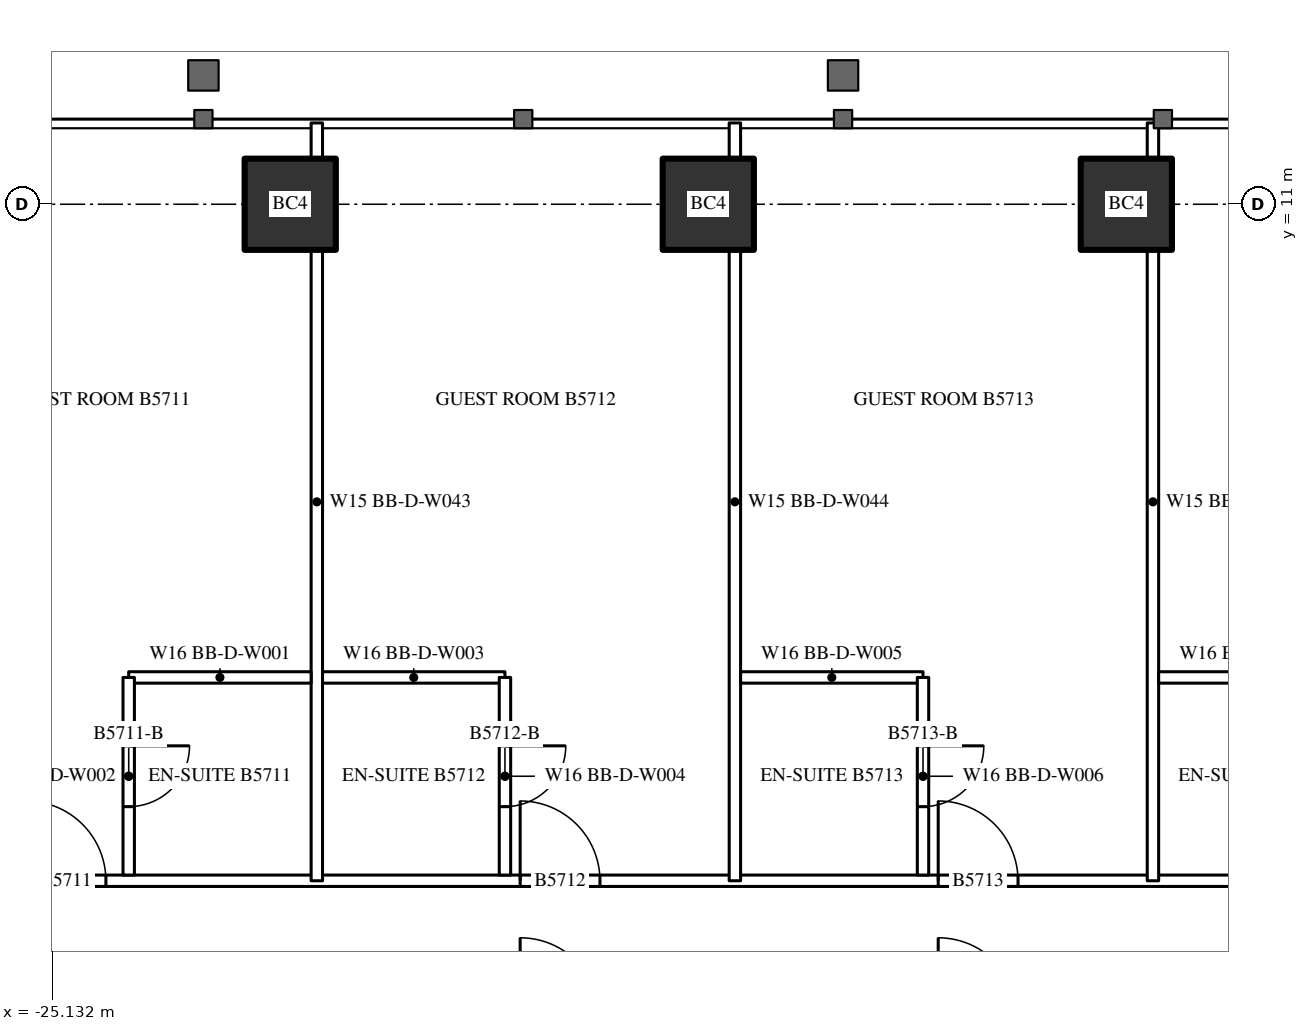
"""IFC4 building model, lengths in metres.
Left out: names, types, materials, properties, quantities, classifications, styles, units other than length and angle.
Written with IfcOpenShell. Run it as: python <this file> out.ifc"""

import sys

from ifc_helpers import new_model, si_unit, direction, frame, frame_2d, origin, origin_2d, place, context, subcontext, project, spatial, rectangle, hollow_rectangle, extrude, element, fill, save


model = new_model("IFC4")
c1 = context("Model", 3, precision=1e-05, world=origin(), true_north=direction((0.0, 1.0)))
c2 = subcontext(c1, "Body", "Model", "MODEL_VIEW")
j1 = project(units=[si_unit("LENGTHUNIT", "METRE"), si_unit("PLANEANGLEUNIT", "RADIAN")], contexts=[c1])
p1 = place(None, origin())
s1 = spatial("IfcSite", under=j1, at=p1, CompositionType="ELEMENT")
p2 = place(p1, origin())
s2 = spatial("IfcBuilding", under=s1, at=p2, CompositionType="ELEMENT")
p3 = place(p2, frame((0.0, 0.0, 215.3)))
s3 = spatial("IfcBuildingStorey", under=s2, at=p3, CompositionType="ELEMENT", Elevation=215.3)
for number, where, z_axis, x_axis in (
    (1, (-22.0, 11.0, 0.0), (0.0, 0.0, 1.0), (1.0, 0.0, 0.0)),
    (2, (-16.5, 11.0, 0.0), (0.0, 0.0, 1.0), (1.0, 0.0, 0.0)),
    (3, (-11.0, 11.0, 0.0), (0.0, 0.0, 1.0), (1.0, 0.0, 0.0)),
):
    element("IfcColumn", number, at=place(p3, frame(where, z_axis=z_axis, x_axis=x_axis)), inside=s3, PredefinedType="COLUMN", context=c2, shape_type="SweptSolid", body=[
        extrude(hollow_rectangle(XDim=1.2, YDim=1.2, WallThickness=0.12, at=origin_2d()), origin(), (0.0, 0.0, 1.0), 3.6),
    ])
p4 = place(p3, frame((-27.5, 2.1, 0.0), z_axis=(0.0, 0.0, 1.0), x_axis=(1.0, 0.0, 0.0)))
e4 = element("IfcWall", 4, at=p4, inside=s3, PredefinedType="PARTITIONING", context=c2, shape_type="SweptSolid", body=[
    extrude(rectangle(XDim=55.0, YDim=0.15, at=frame_2d((27.5, 0.0))), origin(), (0.0, 0.0, 1.0), 3.4),
])
p5 = place(p4, frame((2.025, 0.0, 0.0)))
e5 = element("IfcOpeningElement", 5, at=p5, cuts=e4, PredefinedType="OPENING", context=c2, shape_type="SweptSolid", body=[
    extrude(rectangle(XDim=1.05, YDim=2.4, at=frame_2d((0.525, 1.2))), frame((0.0, 0.085, 0.0), z_axis=(0.0, -1.0, 0.0), x_axis=(1.0, 0.0, 0.0)), (0.0, 0.0, 1.0), 0.17),
])
p6 = place(p4, frame((8.525, 0.0, 0.0)))
e6 = element("IfcOpeningElement", 6, at=p6, cuts=e4, PredefinedType="OPENING", context=c2, shape_type="SweptSolid", body=[
    extrude(rectangle(XDim=1.05, YDim=2.4, at=frame_2d((0.525, 1.2))), frame((0.0, 0.085, 0.0), z_axis=(0.0, -1.0, 0.0), x_axis=(1.0, 0.0, 0.0)), (0.0, 0.0, 1.0), 0.17),
])
p7 = place(p4, frame((14.025, 0.0, 0.0)))
e7 = element("IfcOpeningElement", 7, at=p7, cuts=e4, PredefinedType="OPENING", context=c2, shape_type="SweptSolid", body=[
    extrude(rectangle(XDim=1.05, YDim=2.4, at=frame_2d((0.525, 1.2))), frame((0.0, 0.085, 0.0), z_axis=(0.0, -1.0, 0.0), x_axis=(1.0, 0.0, 0.0)), (0.0, 0.0, 1.0), 0.17),
])
p8 = place(p4, frame((19.525, 0.0, 0.0)))
e8 = element("IfcOpeningElement", 8, at=p8, cuts=e4, PredefinedType="OPENING", context=c2, shape_type="SweptSolid", body=[
    extrude(rectangle(XDim=1.05, YDim=2.4, at=frame_2d((0.525, 1.2))), frame((0.0, 0.085, 0.0), z_axis=(0.0, -1.0, 0.0), x_axis=(1.0, 0.0, 0.0)), (0.0, 0.0, 1.0), 0.17),
])
p9 = place(p4, frame((25.025, 0.0, 0.0)))
e9 = element("IfcOpeningElement", 9, at=p9, cuts=e4, PredefinedType="OPENING", context=c2, shape_type="SweptSolid", body=[
    extrude(rectangle(XDim=1.05, YDim=2.4, at=frame_2d((0.525, 1.2))), frame((0.0, 0.085, 0.0), z_axis=(0.0, -1.0, 0.0), x_axis=(1.0, 0.0, 0.0)), (0.0, 0.0, 1.0), 0.17),
])
p10 = place(p4, frame((30.525, 0.0, 0.0)))
e10 = element("IfcOpeningElement", 10, at=p10, cuts=e4, PredefinedType="OPENING", context=c2, shape_type="SweptSolid", body=[
    extrude(rectangle(XDim=1.05, YDim=2.4, at=frame_2d((0.525, 1.2))), frame((0.0, 0.085, 0.0), z_axis=(0.0, -1.0, 0.0), x_axis=(1.0, 0.0, 0.0)), (0.0, 0.0, 1.0), 0.17),
])
p11 = place(p4, frame((36.025, 0.0, 0.0)))
e11 = element("IfcOpeningElement", 11, at=p11, cuts=e4, PredefinedType="OPENING", context=c2, shape_type="SweptSolid", body=[
    extrude(rectangle(XDim=1.05, YDim=2.4, at=frame_2d((0.525, 1.2))), frame((0.0, 0.085, 0.0), z_axis=(0.0, -1.0, 0.0), x_axis=(1.0, 0.0, 0.0)), (0.0, 0.0, 1.0), 0.17),
])
p12 = place(p4, frame((41.525, 0.0, 0.0)))
e12 = element("IfcOpeningElement", 12, at=p12, cuts=e4, PredefinedType="OPENING", context=c2, shape_type="SweptSolid", body=[
    extrude(rectangle(XDim=1.05, YDim=2.4, at=frame_2d((0.525, 1.2))), frame((0.0, 0.085, 0.0), z_axis=(0.0, -1.0, 0.0), x_axis=(1.0, 0.0, 0.0)), (0.0, 0.0, 1.0), 0.17),
])
p13 = place(p4, frame((47.025, 0.0, 0.0)))
e13 = element("IfcOpeningElement", 13, at=p13, cuts=e4, PredefinedType="OPENING", context=c2, shape_type="SweptSolid", body=[
    extrude(rectangle(XDim=1.05, YDim=2.4, at=frame_2d((0.525, 1.2))), frame((0.0, 0.085, 0.0), z_axis=(0.0, -1.0, 0.0), x_axis=(1.0, 0.0, 0.0)), (0.0, 0.0, 1.0), 0.17),
])
p14 = place(p4, frame((52.525, 0.0, 0.0)))
e14 = element("IfcOpeningElement", 14, at=p14, cuts=e4, PredefinedType="OPENING", context=c2, shape_type="SweptSolid", body=[
    extrude(rectangle(XDim=1.05, YDim=2.4, at=frame_2d((0.525, 1.2))), frame((0.0, 0.085, 0.0), z_axis=(0.0, -1.0, 0.0), x_axis=(1.0, 0.0, 0.0)), (0.0, 0.0, 1.0), 0.17),
])
for number, where, z_axis, x_axis in (
    (15, (-21.65, 2.1, 0.0), (0.0, 0.0, 1.0), (0.0, 1.0, 0.0)),
    (16, (-16.15, 2.1, 0.0), (0.0, 0.0, 1.0), (0.0, 1.0, 0.0)),
    (17, (-10.65, 2.1, 0.0), (0.0, 0.0, 1.0), (0.0, 1.0, 0.0)),
):
    element("IfcWall", number, at=place(p3, frame(where, z_axis=z_axis, x_axis=x_axis)), inside=s3, PredefinedType="PARTITIONING", context=c2, shape_type="SweptSolid", body=[
        extrude(rectangle(XDim=9.97, YDim=0.15, at=frame_2d((4.985, 0.0))), origin(), (0.0, 0.0, 1.0), 3.4),
    ])
p15 = place(p3, frame((-24.125, 4.775, 0.0), z_axis=(0.0, 0.0, 1.0), x_axis=(1.0, 0.0, 0.0)))
e18 = element("IfcWall", 18, at=p15, inside=s3, PredefinedType="PARTITIONING", context=c2, shape_type="SweptSolid", body=[
    extrude(rectangle(XDim=2.4, YDim=0.15, at=frame_2d((1.2, 0.0))), origin(), (0.0, 0.0, 1.0), 3.4),
])
p16 = place(p3, frame((-24.125, 2.175, 0.0), z_axis=(0.0, 0.0, 1.0), x_axis=(0.0, 1.0, 0.0)))
e19 = element("IfcWall", 19, at=p16, inside=s3, PredefinedType="PARTITIONING", context=c2, shape_type="SweptSolid", body=[
    extrude(rectangle(XDim=2.6, YDim=0.15, at=frame_2d((1.3, 0.0))), origin(), (0.0, 0.0, 1.0), 3.4),
])
p17 = place(p16, frame((0.9, 0.0, 0.0)))
e20 = element("IfcOpeningElement", 20, at=p17, cuts=e19, PredefinedType="OPENING", context=c2, shape_type="SweptSolid", body=[
    extrude(rectangle(XDim=0.8, YDim=2.2, at=frame_2d((0.4, 1.1))), frame((0.0, 0.085, 0.0), z_axis=(0.0, -1.0, 0.0), x_axis=(1.0, 0.0, 0.0)), (0.0, 0.0, 1.0), 0.17),
])
p18 = place(p3, frame((-21.575, 4.775, 0.0), z_axis=(0.0, 0.0, 1.0), x_axis=(1.0, 0.0, 0.0)))
e21 = element("IfcWall", 21, at=p18, inside=s3, PredefinedType="PARTITIONING", context=c2, shape_type="SweptSolid", body=[
    extrude(rectangle(XDim=2.4, YDim=0.15, at=frame_2d((1.2, 0.0))), origin(), (0.0, 0.0, 1.0), 3.4),
])
p19 = place(p3, frame((-19.175, 2.175, 0.0), z_axis=(0.0, 0.0, 1.0), x_axis=(0.0, 1.0, 0.0)))
e22 = element("IfcWall", 22, at=p19, inside=s3, PredefinedType="PARTITIONING", context=c2, shape_type="SweptSolid", body=[
    extrude(rectangle(XDim=2.6, YDim=0.15, at=frame_2d((1.3, 0.0))), origin(), (0.0, 0.0, 1.0), 3.4),
])
p20 = place(p19, frame((0.9, 0.0, 0.0)))
e23 = element("IfcOpeningElement", 23, at=p20, cuts=e22, PredefinedType="OPENING", context=c2, shape_type="SweptSolid", body=[
    extrude(rectangle(XDim=0.8, YDim=2.2, at=frame_2d((0.4, 1.1))), frame((0.0, 0.085, 0.0), z_axis=(0.0, -1.0, 0.0), x_axis=(1.0, 0.0, 0.0)), (0.0, 0.0, 1.0), 0.17),
])
p21 = place(p3, frame((-16.075, 4.775, 0.0), z_axis=(0.0, 0.0, 1.0), x_axis=(1.0, 0.0, 0.0)))
e24 = element("IfcWall", 24, at=p21, inside=s3, PredefinedType="PARTITIONING", context=c2, shape_type="SweptSolid", body=[
    extrude(rectangle(XDim=2.4, YDim=0.15, at=frame_2d((1.2, 0.0))), origin(), (0.0, 0.0, 1.0), 3.4),
])
p22 = place(p3, frame((-13.675, 2.175, 0.0), z_axis=(0.0, 0.0, 1.0), x_axis=(0.0, 1.0, 0.0)))
e25 = element("IfcWall", 25, at=p22, inside=s3, PredefinedType="PARTITIONING", context=c2, shape_type="SweptSolid", body=[
    extrude(rectangle(XDim=2.6, YDim=0.15, at=frame_2d((1.3, 0.0))), origin(), (0.0, 0.0, 1.0), 3.4),
])
p23 = place(p22, frame((0.9, 0.0, 0.0)))
e26 = element("IfcOpeningElement", 26, at=p23, cuts=e25, PredefinedType="OPENING", context=c2, shape_type="SweptSolid", body=[
    extrude(rectangle(XDim=0.8, YDim=2.2, at=frame_2d((0.4, 1.1))), frame((0.0, 0.085, 0.0), z_axis=(0.0, -1.0, 0.0), x_axis=(1.0, 0.0, 0.0)), (0.0, 0.0, 1.0), 0.17),
])
p24 = place(p3, frame((-10.575, 4.775, 0.0), z_axis=(0.0, 0.0, 1.0), x_axis=(1.0, 0.0, 0.0)))
e27 = element("IfcWall", 27, at=p24, inside=s3, PredefinedType="PARTITIONING", context=c2, shape_type="SweptSolid", body=[
    extrude(rectangle(XDim=2.4, YDim=0.15, at=frame_2d((1.2, 0.0))), origin(), (0.0, 0.0, 1.0), 3.4),
])
p25 = place(p17, origin())
e28 = element("IfcDoor", 28, at=p25, inside=s3, OperationType="SINGLE_SWING_RIGHT", PredefinedType="DOOR", context=c2, shape_type="SweptSolid", body=[
    extrude(rectangle(XDim=0.8, YDim=2.2, at=frame_2d((0.4, 1.1))), frame((0.0, 0.025, 0.0), z_axis=(0.0, -1.0, 0.0), x_axis=(1.0, 0.0, 0.0)), (0.0, 0.0, 1.0), 0.05),
])
fill(e20, e28)
p26 = place(p5, origin())
e29 = element("IfcDoor", 29, at=p26, inside=s3, OperationType="SINGLE_SWING_LEFT", PredefinedType="DOOR", context=c2, shape_type="SweptSolid", body=[
    extrude(rectangle(XDim=1.05, YDim=2.4, at=frame_2d((0.525, 1.2))), frame((0.0, 0.025, 0.0), z_axis=(0.0, -1.0, 0.0), x_axis=(1.0, 0.0, 0.0)), (0.0, 0.0, 1.0), 0.05),
])
fill(e5, e29)
p27 = place(p20, origin())
e30 = element("IfcDoor", 30, at=p27, inside=s3, OperationType="SINGLE_SWING_RIGHT", PredefinedType="DOOR", context=c2, shape_type="SweptSolid", body=[
    extrude(rectangle(XDim=0.8, YDim=2.2, at=frame_2d((0.4, 1.1))), frame((0.0, 0.025, 0.0), z_axis=(0.0, -1.0, 0.0), x_axis=(1.0, 0.0, 0.0)), (0.0, 0.0, 1.0), 0.05),
])
fill(e23, e30)
p28 = place(p6, origin())
e31 = element("IfcDoor", 31, at=p28, inside=s3, OperationType="SINGLE_SWING_LEFT", PredefinedType="DOOR", context=c2, shape_type="SweptSolid", body=[
    extrude(rectangle(XDim=1.05, YDim=2.4, at=frame_2d((0.525, 1.2))), frame((0.0, 0.025, 0.0), z_axis=(0.0, -1.0, 0.0), x_axis=(1.0, 0.0, 0.0)), (0.0, 0.0, 1.0), 0.05),
])
fill(e6, e31)
p29 = place(p23, origin())
e32 = element("IfcDoor", 32, at=p29, inside=s3, OperationType="SINGLE_SWING_RIGHT", PredefinedType="DOOR", context=c2, shape_type="SweptSolid", body=[
    extrude(rectangle(XDim=0.8, YDim=2.2, at=frame_2d((0.4, 1.1))), frame((0.0, 0.025, 0.0), z_axis=(0.0, -1.0, 0.0), x_axis=(1.0, 0.0, 0.0)), (0.0, 0.0, 1.0), 0.05),
])
fill(e26, e32)
p30 = place(p7, origin())
e33 = element("IfcDoor", 33, at=p30, inside=s3, OperationType="SINGLE_SWING_LEFT", PredefinedType="DOOR", context=c2, shape_type="SweptSolid", body=[
    extrude(rectangle(XDim=1.05, YDim=2.4, at=frame_2d((0.525, 1.2))), frame((0.0, 0.025, 0.0), z_axis=(0.0, -1.0, 0.0), x_axis=(1.0, 0.0, 0.0)), (0.0, 0.0, 1.0), 0.05),
])
fill(e7, e33)
save(model, sys.argv[1])
